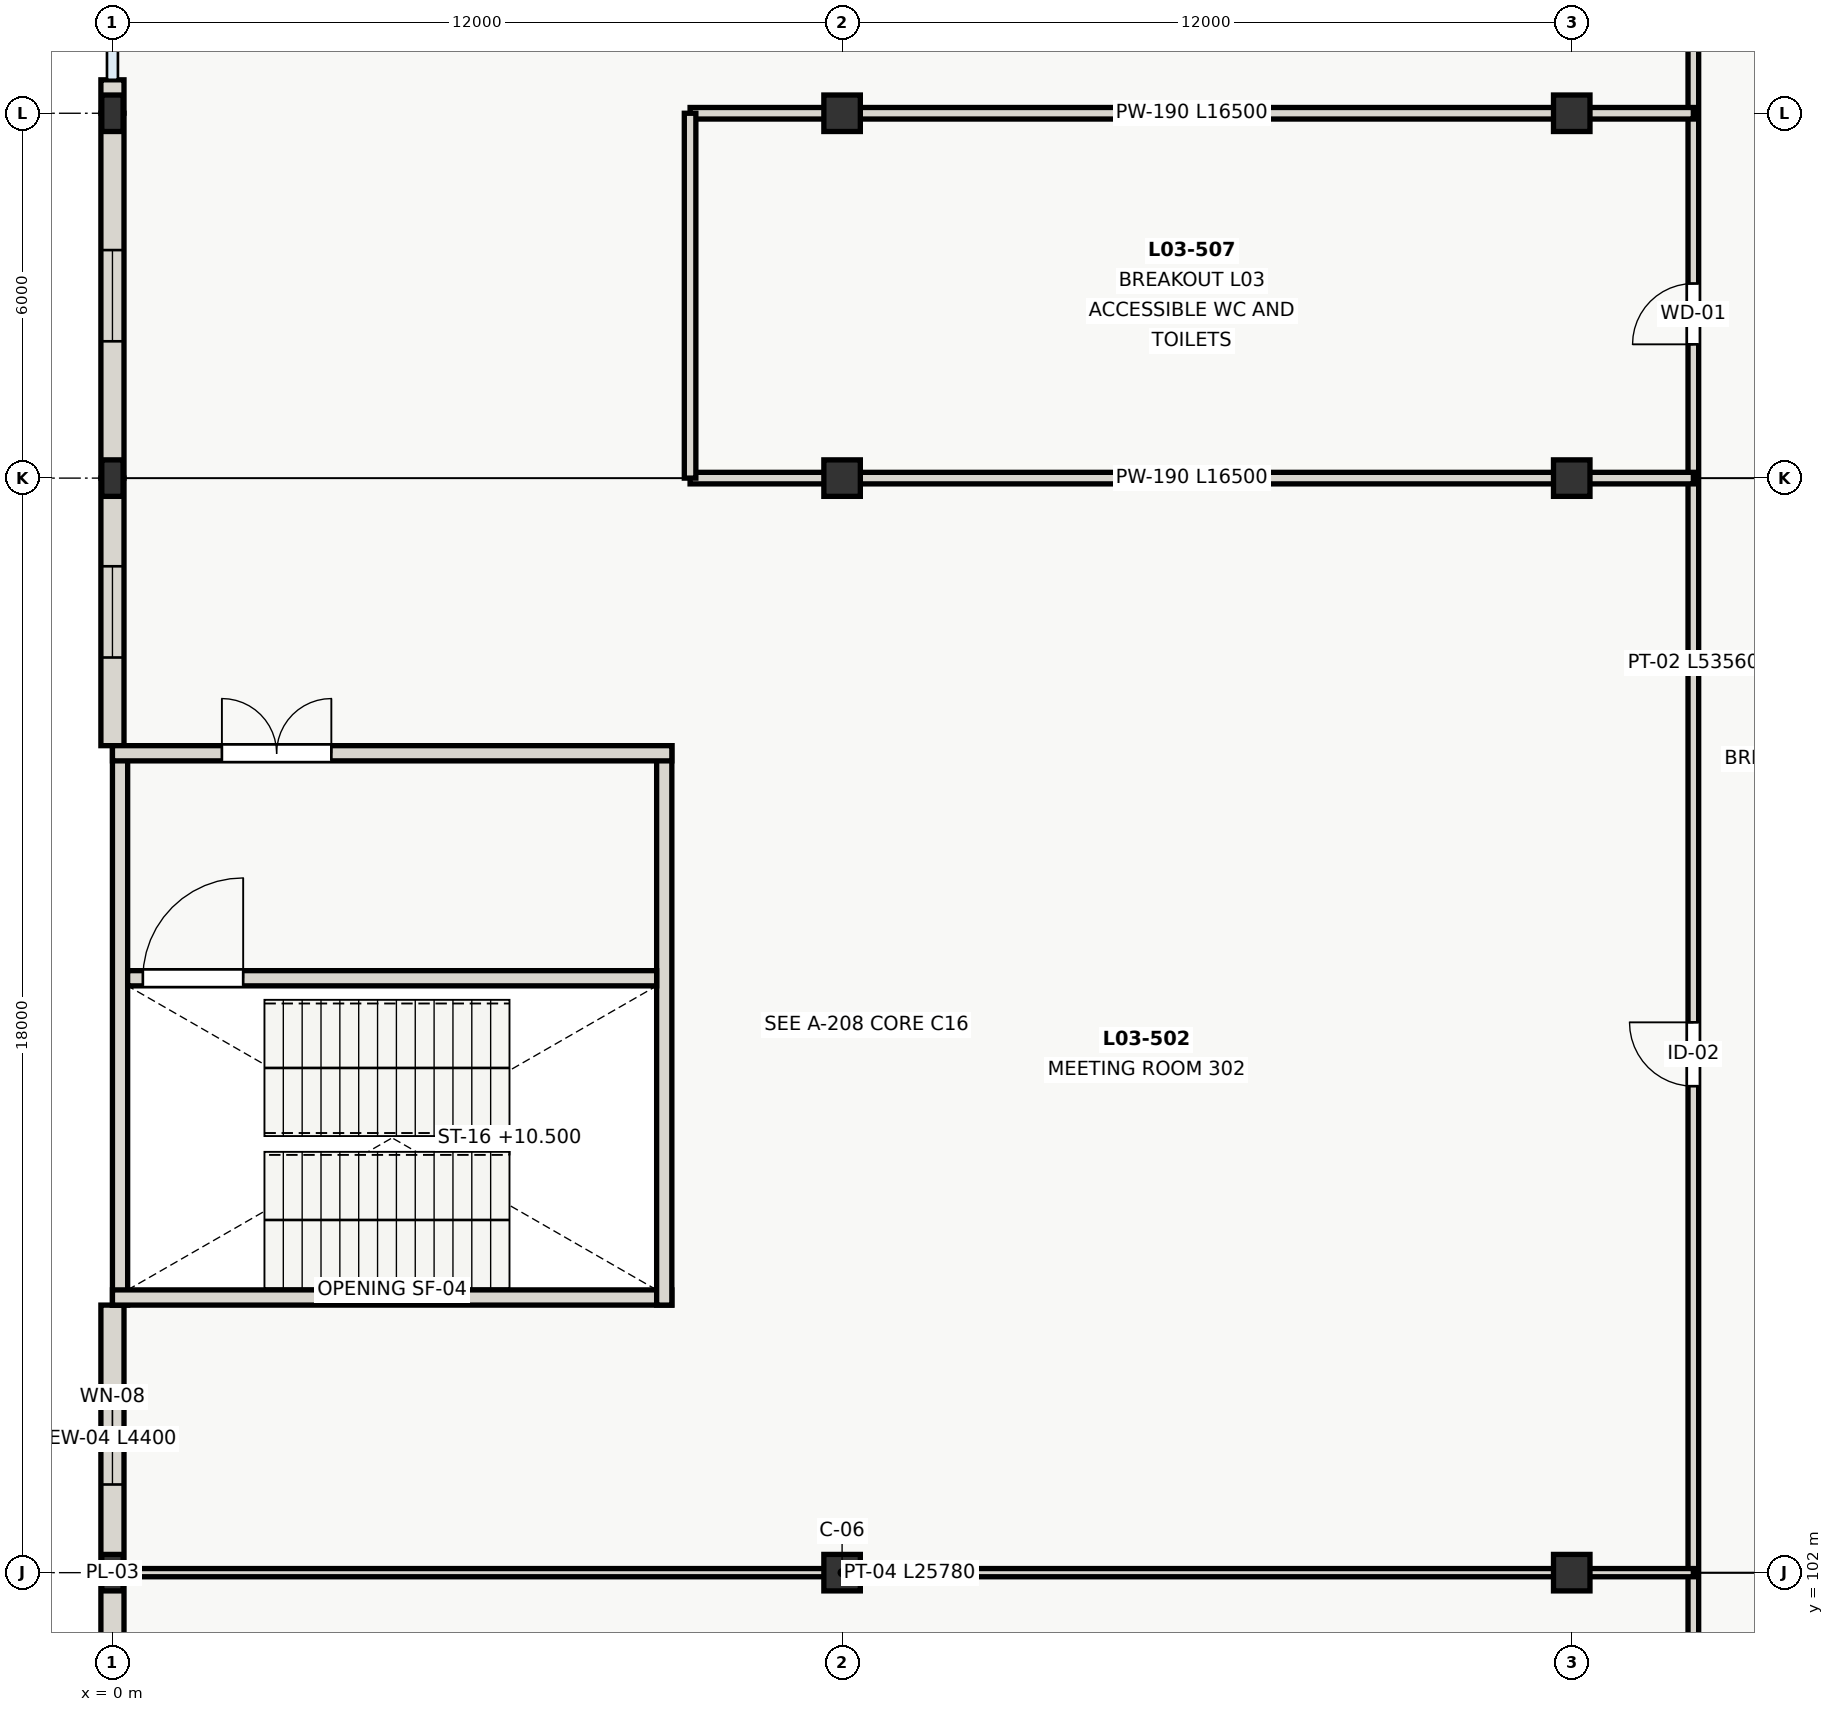
"""IFC4 building model, lengths in metres.
Left out: names, types, materials, properties, quantities, classifications, styles, units other than length and angle.
Written with IfcOpenShell. Run it as: python <this file> out.ifc"""

import sys

from ifc_helpers import new_model, si_unit, direction, frame, frame_2d, origin, origin_2d, place, context, subcontext, project, spatial, rectangle, extrude, element, fill, save


model = new_model("IFC4")
c1 = context("Model", 3, precision=1e-05, world=origin(), true_north=direction((0.0, 1.0)))
c2 = subcontext(c1, "Body", "Model", "MODEL_VIEW")
j1 = project(units=[si_unit("LENGTHUNIT", "METRE"), si_unit("PLANEANGLEUNIT", "RADIAN")], contexts=[c1])
p1 = place(None, origin())
s1 = spatial("IfcSite", under=j1, at=p1, CompositionType="ELEMENT")
p2 = place(p1, origin())
s2 = spatial("IfcBuilding", under=s1, at=p2, CompositionType="ELEMENT")
p3 = place(p2, frame((0.0, 0.0, 8.4)))
s3 = spatial("IfcBuildingStorey", under=s2, at=p3, CompositionType="ELEMENT", Elevation=8.4)
p4 = place(p3, frame((0.0, 102.0, 0.0), z_axis=(0.0, 0.0, 1.0), x_axis=(1.0, 0.0, 0.0)))
e1 = element("IfcColumn", 1, at=p4, inside=s3, PredefinedType="PILASTER", context=c2, shape_type="SweptSolid", body=[
    extrude(rectangle(XDim=0.35, YDim=0.6, at=origin_2d()), origin(), (0.0, 0.0, 1.0), 4.2),
])
for number, where, z_axis, x_axis in (
    (2, (12.0, 102.0, 0.0), (0.0, 0.0, 1.0), (1.0, 0.0, 0.0)),
    (3, (24.0, 102.0, 0.0), (0.0, 0.0, 1.0), (1.0, 0.0, 0.0)),
):
    element("IfcColumn", number, at=place(p3, frame(where, z_axis=z_axis, x_axis=x_axis)), inside=s3, PredefinedType="COLUMN", context=c2, shape_type="SweptSolid", body=[
        extrude(rectangle(XDim=0.6, YDim=0.6, at=origin_2d()), origin(), (0.0, 0.0, 1.0), 4.2),
    ])
p5 = place(p3, frame((0.0, 120.0, 0.0), z_axis=(0.0, 0.0, 1.0), x_axis=(1.0, 0.0, 0.0)))
e4 = element("IfcColumn", 4, at=p5, inside=s3, PredefinedType="PILASTER", context=c2, shape_type="SweptSolid", body=[
    extrude(rectangle(XDim=0.35, YDim=0.6, at=origin_2d()), origin(), (0.0, 0.0, 1.0), 4.2),
])
for number, where, z_axis, x_axis in (
    (5, (12.0, 120.0, 0.0), (0.0, 0.0, 1.0), (1.0, 0.0, 0.0)),
    (6, (24.0, 120.0, 0.0), (0.0, 0.0, 1.0), (1.0, 0.0, 0.0)),
):
    element("IfcColumn", number, at=place(p3, frame(where, z_axis=z_axis, x_axis=x_axis)), inside=s3, PredefinedType="COLUMN", context=c2, shape_type="SweptSolid", body=[
        extrude(rectangle(XDim=0.6, YDim=0.6, at=origin_2d()), origin(), (0.0, 0.0, 1.0), 4.2),
    ])
p6 = place(p3, frame((0.0, 126.0, 0.0), z_axis=(0.0, 0.0, 1.0), x_axis=(1.0, 0.0, 0.0)))
e7 = element("IfcColumn", 7, at=p6, inside=s3, PredefinedType="PILASTER", context=c2, shape_type="SweptSolid", body=[
    extrude(rectangle(XDim=0.35, YDim=0.6, at=origin_2d()), origin(), (0.0, 0.0, 1.0), 4.2),
])
for number, where, z_axis, x_axis in (
    (8, (12.0, 126.0, 0.0), (0.0, 0.0, 1.0), (1.0, 0.0, 0.0)),
    (9, (24.0, 126.0, 0.0), (0.0, 0.0, 1.0), (1.0, 0.0, 0.0)),
):
    element("IfcColumn", number, at=place(p3, frame(where, z_axis=z_axis, x_axis=x_axis)), inside=s3, PredefinedType="COLUMN", context=c2, shape_type="SweptSolid", body=[
        extrude(rectangle(XDim=0.6, YDim=0.6, at=origin_2d()), origin(), (0.0, 0.0, 1.0), 4.2),
    ])
p7 = place(p3, frame((0.0, 97.6, 0.0), z_axis=(0.0, 0.0, 1.0), x_axis=(0.0, 1.0, 0.0)))
e10 = element("IfcWall", 10, at=p7, inside=s3, PredefinedType="SOLIDWALL", context=c2, shape_type="SweptSolid", body=[
    extrude(rectangle(XDim=4.4, YDim=0.38, at=frame_2d((2.2, 0.0))), origin(), (0.0, 0.0, 1.0), 3.36),
])
p8 = place(p7, frame((1.45, 0.0, 0.9)))
e11 = element("IfcOpeningElement", 11, at=p8, cuts=e10, PredefinedType="OPENING", context=c2, shape_type="SweptSolid", body=[
    extrude(rectangle(XDim=1.5, YDim=1.95, at=frame_2d((0.75, 0.975))), frame((0.0, 0.2, 0.0), z_axis=(0.0, -1.0, 0.0), x_axis=(1.0, 0.0, 0.0)), (0.0, 0.0, 1.0), 0.4),
])
p9 = place(p3, frame((0.0, 102.0, 0.0), z_axis=(0.0, 0.0, 1.0), x_axis=(0.0, 1.0, 0.0)))
e12 = element("IfcWall", 12, at=p9, inside=s3, PredefinedType="SOLIDWALL", context=c2, shape_type="SweptSolid", body=[
    extrude(rectangle(XDim=4.4, YDim=0.38, at=frame_2d((2.2, 0.0))), origin(), (0.0, 0.0, 1.0), 3.36),
])
p10 = place(p9, frame((1.45, 0.0, 0.9)))
e13 = element("IfcOpeningElement", 13, at=p10, cuts=e12, PredefinedType="OPENING", context=c2, shape_type="SweptSolid", body=[
    extrude(rectangle(XDim=1.5, YDim=1.95, at=frame_2d((0.75, 0.975))), frame((0.0, 0.2, 0.0), z_axis=(0.0, -1.0, 0.0), x_axis=(1.0, 0.0, 0.0)), (0.0, 0.0, 1.0), 0.4),
])
p11 = place(p3, frame((0.0, 115.6, 0.0), z_axis=(0.0, 0.0, 1.0), x_axis=(0.0, 1.0, 0.0)))
e14 = element("IfcWall", 14, at=p11, inside=s3, PredefinedType="SOLIDWALL", context=c2, shape_type="SweptSolid", body=[
    extrude(rectangle(XDim=4.4, YDim=0.38, at=frame_2d((2.2, 0.0))), origin(), (0.0, 0.0, 1.0), 3.36),
])
p12 = place(p11, frame((1.45, 0.0, 0.9)))
e15 = element("IfcOpeningElement", 15, at=p12, cuts=e14, PredefinedType="OPENING", context=c2, shape_type="SweptSolid", body=[
    extrude(rectangle(XDim=1.5, YDim=1.95, at=frame_2d((0.75, 0.975))), frame((0.0, 0.2, 0.0), z_axis=(0.0, -1.0, 0.0), x_axis=(1.0, 0.0, 0.0)), (0.0, 0.0, 1.0), 0.4),
])
p13 = place(p3, frame((0.0, 120.0, 0.0), z_axis=(0.0, 0.0, 1.0), x_axis=(0.0, 1.0, 0.0)))
e16 = element("IfcWall", 16, at=p13, inside=s3, PredefinedType="SOLIDWALL", context=c2, shape_type="SweptSolid", body=[
    extrude(rectangle(XDim=6.0, YDim=0.38, at=frame_2d((3.0, 0.0))), origin(), (0.0, 0.0, 1.0), 3.57),
])
p14 = place(p13, frame((2.25, 0.0, 0.9)))
e17 = element("IfcOpeningElement", 17, at=p14, cuts=e16, PredefinedType="OPENING", context=c2, shape_type="SweptSolid", body=[
    extrude(rectangle(XDim=1.5, YDim=1.95, at=frame_2d((0.75, 0.975))), frame((0.0, 0.2, 0.0), z_axis=(0.0, -1.0, 0.0), x_axis=(1.0, 0.0, 0.0)), (0.0, 0.0, 1.0), 0.4),
])
p15 = place(p3, frame((0.0, 126.002, 0.0), z_axis=(0.0, 0.0, 1.0), x_axis=(0.0, 1.0, 0.0)))
e18 = element("IfcWall", 18, at=p15, inside=s3, PredefinedType="SOLIDWALL", context=c2, shape_type="SweptSolid", body=[
    extrude(rectangle(XDim=0.548, YDim=0.38, at=frame_2d((0.274, 0.0))), origin(), (0.0, 0.0, 1.0), 3.5),
])
p16 = place(p3, frame((0.125, 106.4, 0.0), z_axis=(0.0, 0.0, 1.0), x_axis=(0.0, 1.0, 0.0)))
e19 = element("IfcWall", 19, at=p16, inside=s3, PredefinedType="SHEAR", context=c2, shape_type="SweptSolid", body=[
    extrude(rectangle(XDim=9.2, YDim=0.25, at=frame_2d((4.6, 0.0))), origin(), (0.0, 0.0, 1.0), 4.2),
])
p17 = place(p3, frame((0.0, 106.525, 0.0), z_axis=(0.0, 0.0, 1.0), x_axis=(1.0, 0.0, 0.0)))
e20 = element("IfcWall", 20, at=p17, inside=s3, PredefinedType="SHEAR", context=c2, shape_type="SweptSolid", body=[
    extrude(rectangle(XDim=9.2, YDim=0.25, at=frame_2d((4.6, 0.0))), origin(), (0.0, 0.0, 1.0), 4.2),
])
p18 = place(p3, frame((9.075, 106.4, 0.0), z_axis=(0.0, 0.0, 1.0), x_axis=(0.0, 1.0, 0.0)))
e21 = element("IfcWall", 21, at=p18, inside=s3, PredefinedType="SHEAR", context=c2, shape_type="SweptSolid", body=[
    extrude(rectangle(XDim=9.2, YDim=0.25, at=frame_2d((4.6, 0.0))), origin(), (0.0, 0.0, 1.0), 4.2),
])
p19 = place(p3, frame((0.0, 115.475, 0.0), z_axis=(0.0, 0.0, 1.0), x_axis=(1.0, 0.0, 0.0)))
e22 = element("IfcWall", 22, at=p19, inside=s3, PredefinedType="SHEAR", context=c2, shape_type="SweptSolid", body=[
    extrude(rectangle(XDim=9.2, YDim=0.25, at=frame_2d((4.6, 0.0))), origin(), (0.0, 0.0, 1.0), 4.2),
])
p20 = place(p19, frame((1.8, 0.0, 0.0)))
e23 = element("IfcOpeningElement", 23, at=p20, cuts=e22, PredefinedType="OPENING", context=c2, shape_type="SweptSolid", body=[
    extrude(rectangle(XDim=1.8, YDim=2.15, at=frame_2d((0.9, 1.075))), frame((0.0, 0.135, 0.0), z_axis=(0.0, -1.0, 0.0), x_axis=(1.0, 0.0, 0.0)), (0.0, 0.0, 1.0), 0.27),
])
p21 = place(p3, frame((0.25, 111.775, 0.0), z_axis=(0.0, 0.0, 1.0), x_axis=(1.0, 0.0, 0.0)))
e24 = element("IfcWall", 24, at=p21, inside=s3, PredefinedType="SHEAR", context=c2, shape_type="SweptSolid", body=[
    extrude(rectangle(XDim=8.7, YDim=0.25, at=frame_2d((4.35, 0.0))), origin(), (0.0, 0.0, 1.0), 4.2),
])
p22 = place(p21, frame((0.25, 0.0, 0.0)))
e25 = element("IfcOpeningElement", 25, at=p22, cuts=e24, PredefinedType="OPENING", context=c2, shape_type="SweptSolid", body=[
    extrude(rectangle(XDim=1.65, YDim=2.1, at=frame_2d((0.825, 1.05))), frame((0.0, 0.135, 0.0), z_axis=(0.0, -1.0, 0.0), x_axis=(1.0, 0.0, 0.0)), (0.0, 0.0, 1.0), 0.27),
])
p23 = place(p3, frame((26.0, 84.22, 0.0), z_axis=(0.0, 0.0, 1.0), x_axis=(0.0, 1.0, 0.0)))
e26 = element("IfcWall", 26, at=p23, inside=s3, PredefinedType="PARTITIONING", context=c2, shape_type="SweptSolid", body=[
    extrude(rectangle(XDim=53.56, YDim=0.175, at=frame_2d((26.78, 0.0))), origin(), (0.0, 0.0, 1.0), 3.75),
])
p24 = place(p23, frame((1.98, 0.0, 0.0)))
e27 = element("IfcOpeningElement", 27, at=p24, cuts=e26, PredefinedType="OPENING", context=c2, shape_type="SweptSolid", body=[
    extrude(rectangle(XDim=1.05, YDim=2.1, at=frame_2d((0.525, 1.05))), frame((0.0, 0.097, 0.0), z_axis=(0.0, -1.0, 0.0), x_axis=(1.0, 0.0, 0.0)), (0.0, 0.0, 1.0), 0.195),
])
p25 = place(p23, frame((10.28, 0.0, 0.0)))
e28 = element("IfcOpeningElement", 28, at=p25, cuts=e26, PredefinedType="OPENING", context=c2, shape_type="SweptSolid", body=[
    extrude(rectangle(XDim=1.8, YDim=2.15, at=frame_2d((0.9, 1.075))), frame((0.0, 0.097, 0.0), z_axis=(0.0, -1.0, 0.0), x_axis=(1.0, 0.0, 0.0)), (0.0, 0.0, 1.0), 0.195),
])
p26 = place(p23, frame((14.58, 0.0, 0.0)))
e29 = element("IfcOpeningElement", 29, at=p26, cuts=e26, PredefinedType="OPENING", context=c2, shape_type="SweptSolid", body=[
    extrude(rectangle(XDim=1.05, YDim=2.1, at=frame_2d((0.525, 1.05))), frame((0.0, 0.097, 0.0), z_axis=(0.0, -1.0, 0.0), x_axis=(1.0, 0.0, 0.0)), (0.0, 0.0, 1.0), 0.195),
])
p27 = place(p23, frame((25.78, 0.0, 0.0)))
e30 = element("IfcOpeningElement", 30, at=p27, cuts=e26, PredefinedType="OPENING", context=c2, shape_type="SweptSolid", body=[
    extrude(rectangle(XDim=1.05, YDim=2.1, at=frame_2d((0.525, 1.05))), frame((0.0, 0.097, 0.0), z_axis=(0.0, -1.0, 0.0), x_axis=(1.0, 0.0, 0.0)), (0.0, 0.0, 1.0), 0.195),
])
p28 = place(p23, frame((37.98, 0.0, 0.0)))
e31 = element("IfcOpeningElement", 31, at=p28, cuts=e26, PredefinedType="OPENING", context=c2, shape_type="SweptSolid", body=[
    extrude(rectangle(XDim=1.0, YDim=2.1, at=frame_2d((0.5, 1.05))), frame((0.0, 0.097, 0.0), z_axis=(0.0, -1.0, 0.0), x_axis=(1.0, 0.0, 0.0)), (0.0, 0.0, 1.0), 0.195),
])
p29 = place(p23, frame((47.28, 0.0, 0.0)))
e32 = element("IfcOpeningElement", 32, at=p29, cuts=e26, PredefinedType="OPENING", context=c2, shape_type="SweptSolid", body=[
    extrude(rectangle(XDim=0.98, YDim=2.1, at=frame_2d((0.49, 1.05))), frame((0.0, 0.097, 0.0), z_axis=(0.0, -1.0, 0.0), x_axis=(1.0, 0.0, 0.0)), (0.0, 0.0, 1.0), 0.195),
])
p30 = place(p3, frame((0.22, 102.0, 0.0), z_axis=(0.0, 0.0, 1.0), x_axis=(1.0, 0.0, 0.0)))
e33 = element("IfcWall", 33, at=p30, inside=s3, PredefinedType="PARTITIONING", context=c2, shape_type="SweptSolid", body=[
    extrude(rectangle(XDim=25.78, YDim=0.135, at=frame_2d((12.89, 0.0))), origin(), (0.0, 0.0, 1.0), 3.42),
])
for number, where, z_axis, x_axis in (
    (34, (9.5, 120.0, 0.0), (0.0, 0.0, 1.0), (1.0, 0.0, 0.0)),
    (35, (9.5, 126.0, 0.0), (0.0, 0.0, 1.0), (1.0, 0.0, 0.0)),
):
    element("IfcWall", number, at=place(p3, frame(where, z_axis=z_axis, x_axis=x_axis)), inside=s3, PredefinedType="PLUMBINGWALL", context=c2, shape_type="SweptSolid", body=[
        extrude(rectangle(XDim=16.5, YDim=0.19, at=frame_2d((8.25, 0.0))), origin(), (0.0, 0.0, 1.0), 3.42),
    ])
p31 = place(p3, frame((9.5, 120.0, 0.0), z_axis=(0.0, 0.0, 1.0), x_axis=(0.0, 1.0, 0.0)))
e36 = element("IfcWall", 36, at=p31, inside=s3, PredefinedType="PLUMBINGWALL", context=c2, shape_type="SweptSolid", body=[
    extrude(rectangle(XDim=6.0, YDim=0.19, at=frame_2d((3.0, 0.0))), origin(), (0.0, 0.0, 1.0), 3.75),
])
p32 = place(p10, origin())
e37 = element("IfcWindow", 37, at=p32, inside=s3, PartitioningType="SINGLE_PANEL", PredefinedType="WINDOW", context=c2, shape_type="SweptSolid", body=[
    extrude(rectangle(XDim=1.5, YDim=1.95, at=frame_2d((0.75, 0.975))), frame((0.0, 0.03, 0.0), z_axis=(0.0, -1.0, 0.0), x_axis=(1.0, 0.0, 0.0)), (0.0, 0.0, 1.0), 0.06),
])
fill(e13, e37)
p33 = place(p12, origin())
e38 = element("IfcWindow", 38, at=p33, inside=s3, PartitioningType="SINGLE_PANEL", PredefinedType="WINDOW", context=c2, shape_type="SweptSolid", body=[
    extrude(rectangle(XDim=1.5, YDim=1.95, at=frame_2d((0.75, 0.975))), frame((0.0, 0.03, 0.0), z_axis=(0.0, -1.0, 0.0), x_axis=(1.0, 0.0, 0.0)), (0.0, 0.0, 1.0), 0.06),
])
fill(e15, e38)
p34 = place(p14, origin())
e39 = element("IfcWindow", 39, at=p34, inside=s3, PartitioningType="SINGLE_PANEL", PredefinedType="WINDOW", context=c2, shape_type="SweptSolid", body=[
    extrude(rectangle(XDim=1.5, YDim=1.95, at=frame_2d((0.75, 0.975))), frame((0.0, 0.03, 0.0), z_axis=(0.0, -1.0, 0.0), x_axis=(1.0, 0.0, 0.0)), (0.0, 0.0, 1.0), 0.06),
])
fill(e17, e39)
p35 = place(p20, origin())
e40 = element("IfcDoor", 40, at=p35, inside=s3, OperationType="DOUBLE_DOOR_SINGLE_SWING", PredefinedType="DOOR", context=c2, shape_type="SweptSolid", body=[
    extrude(rectangle(XDim=1.8, YDim=2.15, at=frame_2d((0.9, 1.075))), frame((0.0, 0.025, 0.0), z_axis=(0.0, -1.0, 0.0), x_axis=(1.0, 0.0, 0.0)), (0.0, 0.0, 1.0), 0.05),
])
fill(e23, e40)
p36 = place(p22, origin())
e41 = element("IfcDoor", 41, at=p36, inside=s3, OperationType="SINGLE_SWING_RIGHT", PredefinedType="DOOR", context=c2, shape_type="SweptSolid", body=[
    extrude(rectangle(XDim=1.65, YDim=2.1, at=frame_2d((0.825, 1.05))), frame((0.0, 0.025, 0.0), z_axis=(0.0, -1.0, 0.0), x_axis=(1.0, 0.0, 0.0)), (0.0, 0.0, 1.0), 0.05),
])
fill(e25, e41)
p37 = place(p27, origin())
e42 = element("IfcDoor", 42, at=p37, inside=s3, OperationType="SINGLE_SWING_RIGHT", PredefinedType="DOOR", context=c2, shape_type="SweptSolid", body=[
    extrude(rectangle(XDim=1.05, YDim=2.1, at=frame_2d((0.525, 1.05))), frame((0.0, 0.025, 0.0), z_axis=(0.0, -1.0, 0.0), x_axis=(1.0, 0.0, 0.0)), (0.0, 0.0, 1.0), 0.05),
])
fill(e30, e42)
p38 = place(p28, origin())
e43 = element("IfcDoor", 43, at=p38, inside=s3, OperationType="SINGLE_SWING_LEFT", PredefinedType="DOOR", context=c2, shape_type="SweptSolid", body=[
    extrude(rectangle(XDim=1.0, YDim=2.1, at=frame_2d((0.5, 1.05))), frame((0.0, 0.025, 0.0), z_axis=(0.0, -1.0, 0.0), x_axis=(1.0, 0.0, 0.0)), (0.0, 0.0, 1.0), 0.05),
])
fill(e31, e43)
save(model, sys.argv[1])
